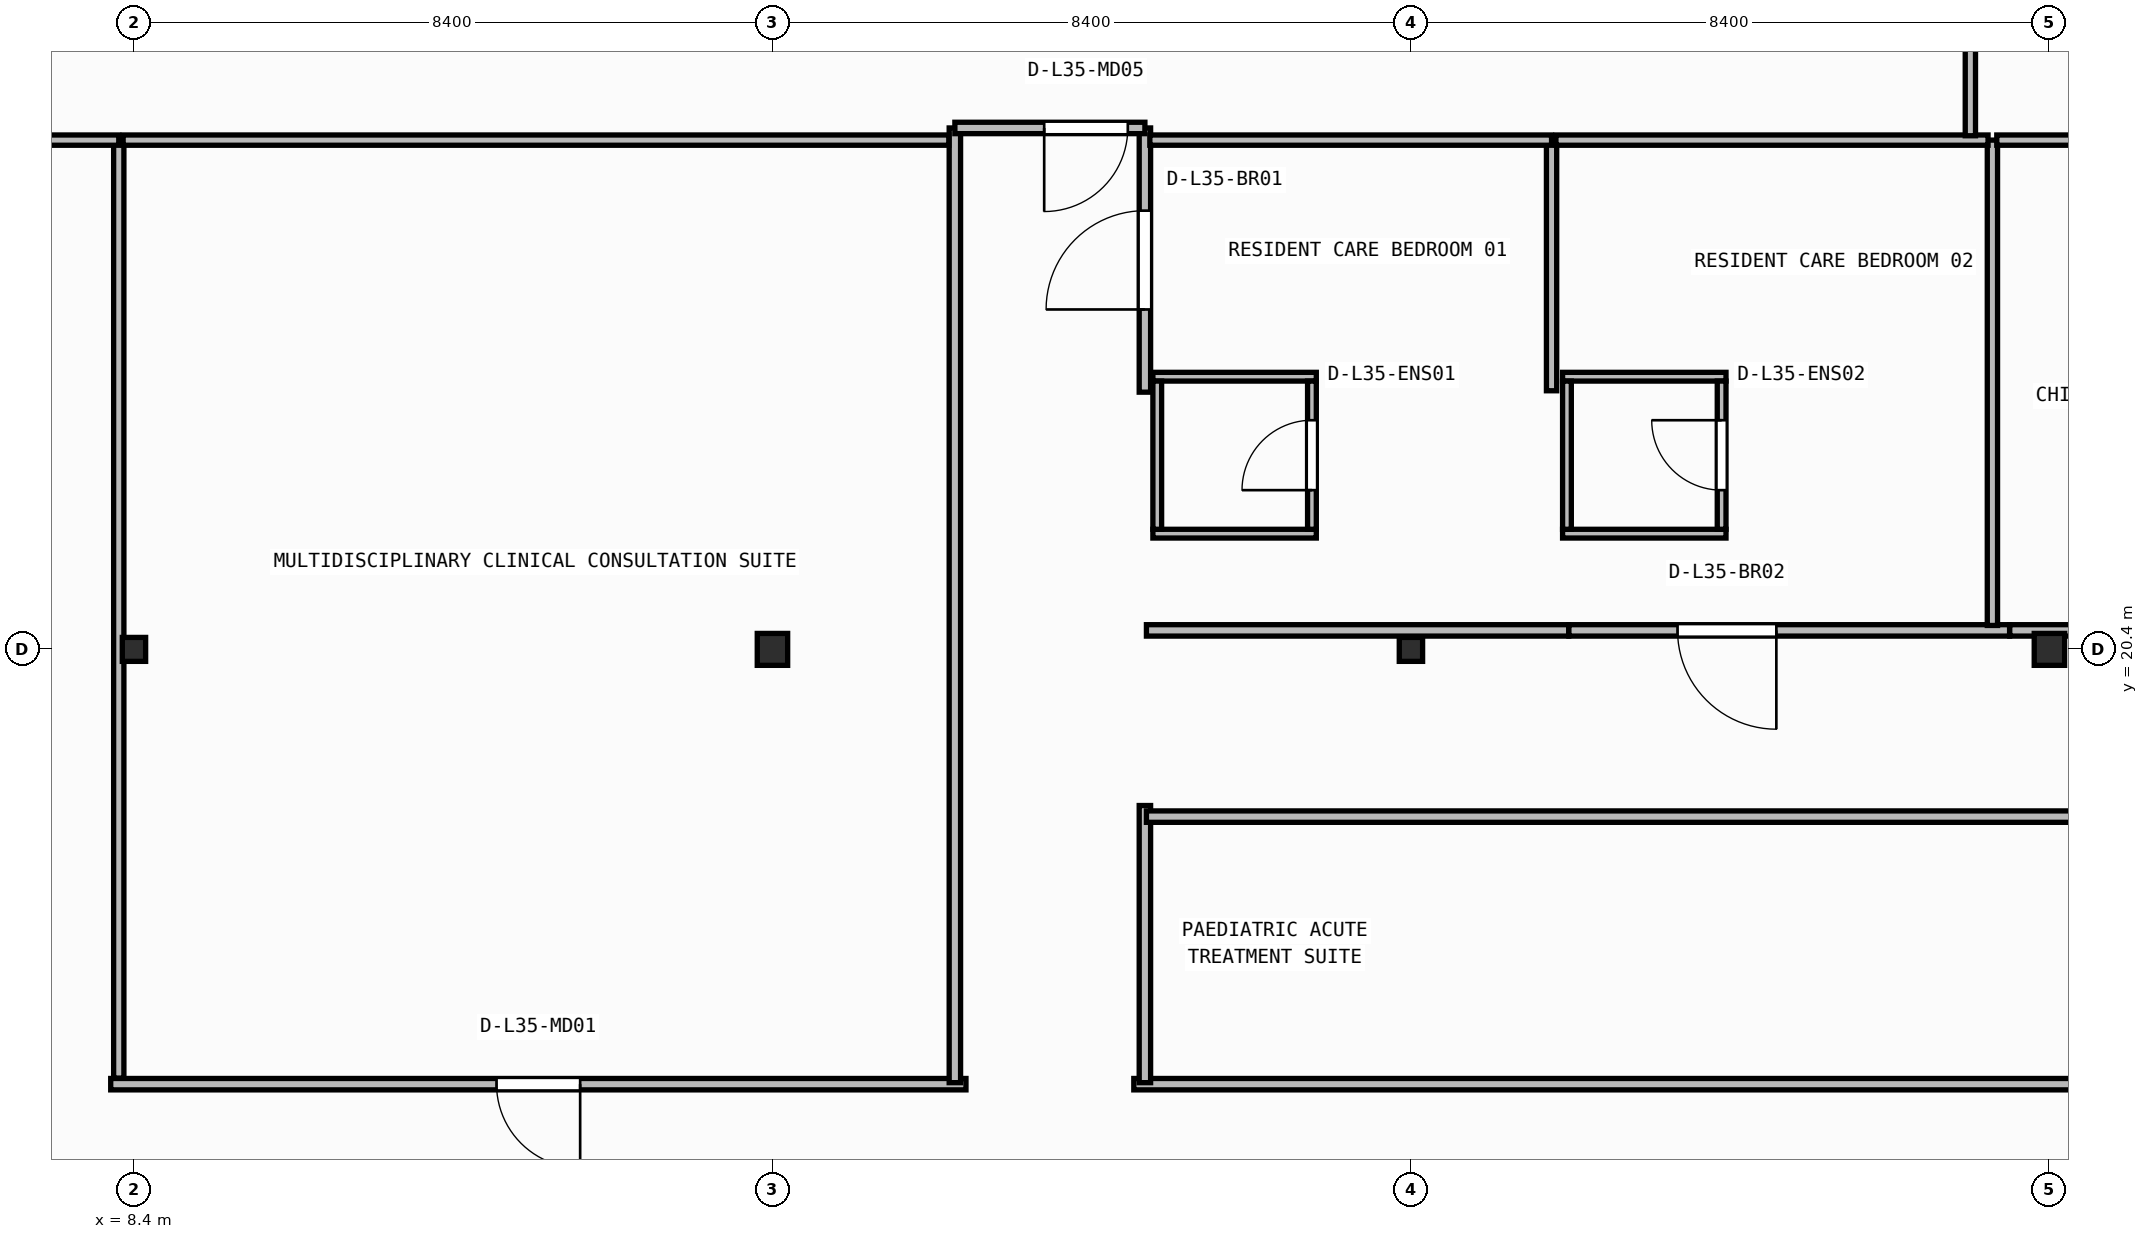
"""IFC4 building model, lengths in metres.
Left out: names, types, materials, properties, quantities, classifications, styles, units other than length and angle.
Written with IfcOpenShell. Run it as: python <this file> out.ifc"""

import sys

from ifc_helpers import new_model, si_unit, direction, frame, frame_2d, origin, origin_2d, place, context, subcontext, project, spatial, rectangle, i_section, extrude, element, fill, save


model = new_model("IFC4")
c1 = context("Model", 3, precision=1e-05, world=origin(), true_north=direction((0.0, 1.0)))
c2 = subcontext(c1, "Body", "Model", "MODEL_VIEW")
j1 = project(units=[si_unit("LENGTHUNIT", "METRE"), si_unit("PLANEANGLEUNIT", "RADIAN")], contexts=[c1])
p1 = place(None, origin())
s1 = spatial("IfcSite", under=j1, at=p1, CompositionType="ELEMENT")
p2 = place(p1, origin())
s2 = spatial("IfcBuilding", under=s1, at=p2, CompositionType="ELEMENT")
p3 = place(p2, frame((0.0, 0.0, 142.85)))
s3 = spatial("IfcBuildingStorey", under=s2, at=p3, CompositionType="ELEMENT", Elevation=142.85)
p4 = place(p3, frame((8.4, 20.4, 0.0), z_axis=(0.0, 0.0, 1.0), x_axis=(1.0, 0.0, 0.0)))
e1 = element("IfcColumn", 1, at=p4, inside=s3, PredefinedType="COLUMN", context=c2, shape_type="SweptSolid", body=[
    extrude(i_section(OverallWidth=0.307, OverallDepth=0.315, WebThickness=0.012, FlangeThickness=0.019, FilletRadius=0.017, at=origin_2d()), origin(), (0.0, 0.0, 1.0), 3.95),
])
p5 = place(p3, frame((16.8, 20.4, 0.0), z_axis=(0.0, 0.0, 1.0), x_axis=(1.0, 0.0, 0.0)))
e2 = element("IfcColumn", 2, at=p5, inside=s3, PredefinedType="COLUMN", context=c2, shape_type="SweptSolid", body=[
    extrude(i_section(OverallWidth=0.4, OverallDepth=0.42, WebThickness=0.025, FlangeThickness=0.04, at=origin_2d()), origin(), (0.0, 0.0, 1.0), 3.95),
])
p6 = place(p3, frame((25.2, 20.4, 0.0), z_axis=(0.0, 0.0, 1.0), x_axis=(1.0, 0.0, 0.0)))
e3 = element("IfcColumn", 3, at=p6, inside=s3, PredefinedType="COLUMN", context=c2, shape_type="SweptSolid", body=[
    extrude(i_section(OverallWidth=0.307, OverallDepth=0.315, WebThickness=0.012, FlangeThickness=0.019, FilletRadius=0.017, at=origin_2d()), origin(), (0.0, 0.0, 1.0), 3.95),
])
p7 = place(p3, frame((33.6, 20.4, 0.0), z_axis=(0.0, 0.0, 1.0), x_axis=(1.0, 0.0, 0.0)))
e4 = element("IfcColumn", 4, at=p7, inside=s3, PredefinedType="COLUMN", context=c2, shape_type="SweptSolid", body=[
    extrude(i_section(OverallWidth=0.4, OverallDepth=0.42, WebThickness=0.025, FlangeThickness=0.04, at=origin_2d()), origin(), (0.0, 0.0, 1.0), 3.95),
])
for number, where, z_axis, x_axis in (
    (5, (21.805, 21.923, 0.0), (0.0, 0.0, 1.0), (1.0, 0.0, 0.0)),
    (6, (21.805, 23.988, 0.0), (0.0, 0.0, 1.0), (1.0, 0.0, 0.0)),
):
    element("IfcWall", number, at=place(p3, frame(where, z_axis=z_axis, x_axis=x_axis)), inside=s3, PredefinedType="PARTITIONING", context=c2, shape_type="SweptSolid", body=[
        extrude(rectangle(XDim=2.15, YDim=0.115, at=frame_2d((1.075, 0.0))), origin(), (0.0, 0.0, 1.0), 3.71),
    ])
p8 = place(p3, frame((21.863, 21.98, 0.0), z_axis=(0.0, 0.0, 1.0), x_axis=(0.0, 1.0, 0.0)))
e7 = element("IfcWall", 7, at=p8, inside=s3, PredefinedType="PARTITIONING", context=c2, shape_type="SweptSolid", body=[
    extrude(rectangle(XDim=1.95, YDim=0.115, at=frame_2d((0.975, 0.0))), origin(), (0.0, 0.0, 1.0), 3.71),
])
p9 = place(p3, frame((23.897, 21.98, 0.0), z_axis=(0.0, 0.0, 1.0), x_axis=(0.0, 1.0, 0.0)))
e8 = element("IfcWall", 8, at=p9, inside=s3, PredefinedType="PARTITIONING", context=c2, shape_type="SweptSolid", body=[
    extrude(rectangle(XDim=1.95, YDim=0.115, at=frame_2d((0.975, 0.0))), origin(), (0.0, 0.0, 1.0), 3.71),
])
p10 = place(p9, frame((0.515, 0.0, 0.0)))
e9 = element("IfcOpeningElement", 9, at=p10, cuts=e8, PredefinedType="OPENING", context=c2, shape_type="SweptSolid", body=[
    extrude(rectangle(XDim=0.92, YDim=2.1, at=frame_2d((0.46, 1.05))), frame((0.0, 0.067, 0.0), z_axis=(0.0, -1.0, 0.0), x_axis=(1.0, 0.0, 0.0)), (0.0, 0.0, 1.0), 0.135),
])
for number, where, z_axis, x_axis in (
    (10, (27.195, 21.923, 0.0), (0.0, 0.0, 1.0), (1.0, 0.0, 0.0)),
    (11, (27.195, 23.988, 0.0), (0.0, 0.0, 1.0), (1.0, 0.0, 0.0)),
):
    element("IfcWall", number, at=place(p3, frame(where, z_axis=z_axis, x_axis=x_axis)), inside=s3, PredefinedType="PARTITIONING", context=c2, shape_type="SweptSolid", body=[
        extrude(rectangle(XDim=2.15, YDim=0.115, at=frame_2d((1.075, 0.0))), origin(), (0.0, 0.0, 1.0), 3.71),
    ])
p11 = place(p3, frame((27.252, 21.98, 0.0), z_axis=(0.0, 0.0, 1.0), x_axis=(0.0, 1.0, 0.0)))
e12 = element("IfcWall", 12, at=p11, inside=s3, PredefinedType="PARTITIONING", context=c2, shape_type="SweptSolid", body=[
    extrude(rectangle(XDim=1.95, YDim=0.115, at=frame_2d((0.975, 0.0))), origin(), (0.0, 0.0, 1.0), 3.71),
])
p12 = place(p3, frame((29.288, 21.98, 0.0), z_axis=(0.0, 0.0, 1.0), x_axis=(0.0, 1.0, 0.0)))
e13 = element("IfcWall", 13, at=p12, inside=s3, PredefinedType="PARTITIONING", context=c2, shape_type="SweptSolid", body=[
    extrude(rectangle(XDim=1.95, YDim=0.115, at=frame_2d((0.975, 0.0))), origin(), (0.0, 0.0, 1.0), 3.71),
])
p13 = place(p12, frame((0.515, 0.0, 0.0)))
e14 = element("IfcOpeningElement", 14, at=p13, cuts=e13, PredefinedType="OPENING", context=c2, shape_type="SweptSolid", body=[
    extrude(rectangle(XDim=0.92, YDim=2.1, at=frame_2d((0.46, 1.05))), frame((0.0, 0.067, 0.0), z_axis=(0.0, -1.0, 0.0), x_axis=(1.0, 0.0, 0.0)), (0.0, 0.0, 1.0), 0.135),
])
p14 = place(p3, frame((19.346, 14.68, 0.0), z_axis=(0.0, 0.0, 1.0), x_axis=(-1.0, 0.0, 0.0)))
e15 = element("IfcWall", 15, at=p14, inside=s3, PredefinedType="PARTITIONING", context=c2, shape_type="SweptSolid", body=[
    extrude(rectangle(XDim=11.252, YDim=0.15, at=frame_2d((5.626, 0.0))), origin(), (0.0, 0.0, 1.0), 3.71),
])
p15 = place(p14, frame((5.076, 0.0, 0.0)))
e16 = element("IfcOpeningElement", 16, at=p15, cuts=e15, PredefinedType="OPENING", context=c2, shape_type="SweptSolid", body=[
    extrude(rectangle(XDim=1.1, YDim=2.1, at=frame_2d((0.55, 1.05))), frame((0.0, 0.085, 0.0), z_axis=(0.0, -1.0, 0.0), x_axis=(1.0, 0.0, 0.0)), (0.0, 0.0, 1.0), 0.17),
])
p16 = place(p3, frame((56.64, 14.68, 0.0), z_axis=(0.0, 0.0, 1.0), x_axis=(-1.0, 0.0, 0.0)))
e17 = element("IfcWall", 17, at=p16, inside=s3, PredefinedType="PARTITIONING", context=c2, shape_type="SweptSolid", body=[
    extrude(rectangle(XDim=35.086, YDim=0.15, at=frame_2d((17.543, 0.0))), origin(), (0.0, 0.0, 1.0), 3.71),
])
p17 = place(p16, frame((16.993, 0.0, 0.0)))
e18 = element("IfcOpeningElement", 18, at=p17, cuts=e17, PredefinedType="OPENING", context=c2, shape_type="SweptSolid", body=[
    extrude(rectangle(XDim=1.1, YDim=2.1, at=frame_2d((0.55, 1.05))), frame((0.0, 0.085, 0.0), z_axis=(0.0, -1.0, 0.0), x_axis=(1.0, 0.0, 0.0)), (0.0, 0.0, 1.0), 0.17),
])
p18 = place(p3, frame((19.2, 27.26, 0.0), z_axis=(0.0, 0.0, 1.0), x_axis=(0.0, -1.0, 0.0)))
e19 = element("IfcWall", 19, at=p18, inside=s3, PredefinedType="PARTITIONING", context=c2, shape_type="SweptSolid", body=[
    extrude(rectangle(XDim=12.56, YDim=0.15, at=frame_2d((6.28, 0.0))), origin(), (0.0, 0.0, 1.0), 3.71),
])
p19 = place(p3, frame((21.7, 14.7, 0.0), z_axis=(0.0, 0.0, 1.0), x_axis=(0.0, 1.0, 0.0)))
e20 = element("IfcWall", 20, at=p19, inside=s3, PredefinedType="PARTITIONING", context=c2, shape_type="SweptSolid", body=[
    extrude(rectangle(XDim=3.646, YDim=0.15, at=frame_2d((1.823, 0.0))), origin(), (0.0, 0.0, 1.0), 3.71),
])
p20 = place(p3, frame((21.7, 23.784, 0.0), z_axis=(0.0, 0.0, 1.0), x_axis=(0.0, 1.0, 0.0)))
e21 = element("IfcWall", 21, at=p20, inside=s3, PredefinedType="PARTITIONING", context=c2, shape_type="SweptSolid", body=[
    extrude(rectangle(XDim=3.476, YDim=0.15, at=frame_2d((1.738, 0.0))), origin(), (0.0, 0.0, 1.0), 3.71),
])
p21 = place(p20, frame((1.088, 0.0, 0.0)))
e22 = element("IfcOpeningElement", 22, at=p21, cuts=e21, PredefinedType="OPENING", context=c2, shape_type="SweptSolid", body=[
    extrude(rectangle(XDim=1.3, YDim=2.15, at=frame_2d((0.65, 1.075))), frame((0.0, 0.085, 0.0), z_axis=(0.0, -1.0, 0.0), x_axis=(1.0, 0.0, 0.0)), (0.0, 0.0, 1.0), 0.17),
])
p22 = place(p3, frame((21.7, 27.26, 0.0), z_axis=(0.0, 0.0, 1.0), x_axis=(-1.0, 0.0, 0.0)))
e23 = element("IfcWall", 23, at=p22, inside=s3, PredefinedType="PARTITIONING", context=c2, shape_type="SweptSolid", body=[
    extrude(rectangle(XDim=2.5, YDim=0.15, at=frame_2d((1.25, 0.0))), origin(), (0.0, 0.0, 1.0), 3.71),
])
p23 = place(p22, frame((0.225, 0.0, 0.0)))
e24 = element("IfcOpeningElement", 24, at=p23, cuts=e23, PredefinedType="OPENING", context=c2, shape_type="SweptSolid", body=[
    extrude(rectangle(XDim=1.1, YDim=2.1, at=frame_2d((0.55, 1.05))), frame((0.0, 0.085, 0.0), z_axis=(0.0, -1.0, 0.0), x_axis=(1.0, 0.0, 0.0)), (0.0, 0.0, 1.0), 0.17),
])
p24 = place(p3, frame((21.72, 18.2, 0.0), z_axis=(0.0, 0.0, 1.0), x_axis=(1.0, 0.0, 0.0)))
e25 = element("IfcWall", 25, at=p24, inside=s3, PredefinedType="PARTITIONING", context=c2, shape_type="SweptSolid", body=[
    extrude(rectangle(XDim=34.92, YDim=0.15, at=frame_2d((17.46, 0.0))), origin(), (0.0, 0.0, 1.0), 3.71),
])
p25 = place(p3, frame((27.276, 20.65, 0.0), z_axis=(0.0, 0.0, 1.0), x_axis=(-1.0, 0.0, 0.0)))
e26 = element("IfcWall", 26, at=p25, inside=s3, PredefinedType="PARTITIONING", context=c2, shape_type="SweptSolid", body=[
    extrude(rectangle(XDim=5.556, YDim=0.15, at=frame_2d((2.778, 0.0))), origin(), (0.0, 0.0, 1.0), 3.083),
])
p26 = place(p3, frame((33.076, 20.65, 0.0), z_axis=(0.0, 0.0, 1.0), x_axis=(-1.0, 0.0, 0.0)))
e27 = element("IfcWall", 27, at=p26, inside=s3, PredefinedType="PARTITIONING", context=c2, shape_type="SweptSolid", body=[
    extrude(rectangle(XDim=5.798, YDim=0.15, at=frame_2d((2.899, 0.0))), origin(), (0.0, 0.0, 1.0), 3.083),
])
p27 = place(p26, frame((3.069, 0.0, 0.0)))
e28 = element("IfcOpeningElement", 28, at=p27, cuts=e27, PredefinedType="OPENING", context=c2, shape_type="SweptSolid", body=[
    extrude(rectangle(XDim=1.3, YDim=2.15, at=frame_2d((0.65, 1.075))), frame((0.0, 0.085, 0.0), z_axis=(0.0, -1.0, 0.0), x_axis=(1.0, 0.0, 0.0)), (0.0, 0.0, 1.0), 0.17),
])
p28 = place(p3, frame((39.336, 20.65, 0.0), z_axis=(0.0, 0.0, 1.0), x_axis=(-1.0, 0.0, 0.0)))
e29 = element("IfcWall", 29, at=p28, inside=s3, PredefinedType="PARTITIONING", context=c2, shape_type="SweptSolid", body=[
    extrude(rectangle(XDim=6.258, YDim=0.15, at=frame_2d((3.129, 0.0))), origin(), (0.0, 0.0, 1.0), 3.083),
])
p29 = place(p28, frame((0.319, 0.0, 0.0)))
e30 = element("IfcOpeningElement", 30, at=p29, cuts=e29, PredefinedType="OPENING", context=c2, shape_type="SweptSolid", body=[
    extrude(rectangle(XDim=1.1, YDim=2.1, at=frame_2d((0.55, 1.05))), frame((0.0, 0.085, 0.0), z_axis=(0.0, -1.0, 0.0), x_axis=(1.0, 0.0, 0.0)), (0.0, 0.0, 1.0), 0.17),
])
p30 = place(p3, frame((8.2, 14.76, 0.0), z_axis=(0.0, 0.0, 1.0), x_axis=(0.0, 1.0, 0.0)))
e31 = element("IfcWall", 31, at=p30, inside=s3, PredefinedType="PARTITIONING", context=c2, shape_type="SweptSolid", body=[
    extrude(rectangle(XDim=12.34, YDim=0.135, at=frame_2d((6.17, 0.0))), origin(), (0.0, 0.0, 1.0), 3.152),
])
p31 = place(p3, frame((8.2, 27.1, 0.0), z_axis=(0.0, 0.0, 1.0), x_axis=(-1.0, 0.0, 0.0)))
e32 = element("IfcWall", 32, at=p31, inside=s3, PredefinedType="PARTITIONING", context=c2, shape_type="SweptSolid", body=[
    extrude(rectangle(XDim=7.96, YDim=0.135, at=frame_2d((3.98, 0.0))), origin(), (0.0, 0.0, 1.0), 3.71),
])
p32 = place(p3, frame((19.12, 27.1, 0.0), z_axis=(0.0, 0.0, 1.0), x_axis=(-1.0, 0.0, 0.0)))
e33 = element("IfcWall", 33, at=p32, inside=s3, PredefinedType="PARTITIONING", context=c2, shape_type="SweptSolid", body=[
    extrude(rectangle(XDim=10.863, YDim=0.135, at=frame_2d((5.431, 0.0))), origin(), (0.0, 0.0, 1.0), 3.71),
])
p33 = place(p3, frame((27.05, 23.802, 0.0), z_axis=(0.0, 0.0, 1.0), x_axis=(0.0, 1.0, 0.0)))
e34 = element("IfcWall", 34, at=p33, inside=s3, PredefinedType="PARTITIONING", context=c2, shape_type="SweptSolid", body=[
    extrude(rectangle(XDim=3.298, YDim=0.135, at=frame_2d((1.649, 0.0))), origin(), (0.0, 0.0, 1.0), 3.71),
])
p34 = place(p3, frame((27.05, 27.1, 0.0), z_axis=(0.0, 0.0, 1.0), x_axis=(-1.0, 0.0, 0.0)))
e35 = element("IfcWall", 35, at=p34, inside=s3, PredefinedType="PARTITIONING", context=c2, shape_type="SweptSolid", body=[
    extrude(rectangle(XDim=5.285, YDim=0.135, at=frame_2d((2.643, 0.0))), origin(), (0.0, 0.0, 1.0), 3.71),
])
p35 = place(p3, frame((32.85, 20.715, 0.0), z_axis=(0.0, 0.0, 1.0), x_axis=(0.0, 1.0, 0.0)))
e36 = element("IfcWall", 36, at=p35, inside=s3, PredefinedType="PARTITIONING", context=c2, shape_type="SweptSolid", body=[
    extrude(rectangle(XDim=6.385, YDim=0.135, at=frame_2d((3.192, 0.0))), origin(), (0.0, 0.0, 1.0), 3.71),
])
p36 = place(p3, frame((32.792, 27.1, 0.0), z_axis=(0.0, 0.0, 1.0), x_axis=(-1.0, 0.0, 0.0)))
e37 = element("IfcWall", 37, at=p36, inside=s3, PredefinedType="PARTITIONING", context=c2, shape_type="SweptSolid", body=[
    extrude(rectangle(XDim=5.685, YDim=0.135, at=frame_2d((2.843, 0.0))), origin(), (0.0, 0.0, 1.0), 3.71),
])
p37 = place(p3, frame((39.11, 27.1, 0.0), z_axis=(0.0, 0.0, 1.0), x_axis=(-1.0, 0.0, 0.0)))
e38 = element("IfcWall", 38, at=p37, inside=s3, PredefinedType="PARTITIONING", context=c2, shape_type="SweptSolid", body=[
    extrude(rectangle(XDim=6.203, YDim=0.135, at=frame_2d((3.101, 0.0))), origin(), (0.0, 0.0, 1.0), 3.71),
])
p38 = place(p37, frame((0.318, 0.0, 0.0)))
e39 = element("IfcOpeningElement", 39, at=p38, cuts=e38, PredefinedType="OPENING", context=c2, shape_type="SweptSolid", body=[
    extrude(rectangle(XDim=1.1, YDim=2.1, at=frame_2d((0.55, 1.05))), frame((0.0, 0.077, 0.0), z_axis=(0.0, -1.0, 0.0), x_axis=(1.0, 0.0, 0.0)), (0.0, 0.0, 1.0), 0.155),
])
p39 = place(p3, frame((32.56, 27.157, 0.0), z_axis=(0.0, 0.0, 1.0), x_axis=(0.0, 1.0, 0.0)))
e40 = element("IfcWall", 40, at=p39, inside=s3, PredefinedType="PARTITIONING", context=c2, shape_type="SweptSolid", body=[
    extrude(rectangle(XDim=4.166, YDim=0.135, at=frame_2d((2.083, 0.0))), origin(), (0.0, 0.0, 1.0), 3.71),
])
p40 = place(p10, origin())
e41 = element("IfcDoor", 41, at=p40, inside=s3, OperationType="SINGLE_SWING_LEFT", PredefinedType="DOOR", context=c2, shape_type="SweptSolid", body=[
    extrude(rectangle(XDim=0.92, YDim=2.1, at=frame_2d((0.46, 1.05))), frame((0.0, 0.025, 0.0), z_axis=(0.0, -1.0, 0.0), x_axis=(1.0, 0.0, 0.0)), (0.0, 0.0, 1.0), 0.05),
])
fill(e9, e41)
p41 = place(p13, origin())
e42 = element("IfcDoor", 42, at=p41, inside=s3, OperationType="SINGLE_SWING_RIGHT", PredefinedType="DOOR", context=c2, shape_type="SweptSolid", body=[
    extrude(rectangle(XDim=0.92, YDim=2.1, at=frame_2d((0.46, 1.05))), frame((0.0, 0.025, 0.0), z_axis=(0.0, -1.0, 0.0), x_axis=(1.0, 0.0, 0.0)), (0.0, 0.0, 1.0), 0.05),
])
fill(e14, e42)
p42 = place(p15, origin())
e43 = element("IfcDoor", 43, at=p42, inside=s3, OperationType="SINGLE_SWING_LEFT", PredefinedType="DOOR", context=c2, shape_type="SweptSolid", body=[
    extrude(rectangle(XDim=1.1, YDim=2.1, at=frame_2d((0.55, 1.05))), frame((0.0, 0.025, 0.0), z_axis=(0.0, -1.0, 0.0), x_axis=(1.0, 0.0, 0.0)), (0.0, 0.0, 1.0), 0.05),
])
fill(e16, e43)
p43 = place(p21, origin())
e44 = element("IfcDoor", 44, at=p43, inside=s3, OperationType="SINGLE_SWING_LEFT", PredefinedType="DOOR", context=c2, shape_type="SweptSolid", body=[
    extrude(rectangle(XDim=1.3, YDim=2.15, at=frame_2d((0.65, 1.075))), frame((0.0, 0.025, 0.0), z_axis=(0.0, -1.0, 0.0), x_axis=(1.0, 0.0, 0.0)), (0.0, 0.0, 1.0), 0.05),
])
fill(e22, e44)
p44 = place(p23, origin())
e45 = element("IfcDoor", 45, at=p44, inside=s3, OperationType="SINGLE_SWING_RIGHT", PredefinedType="DOOR", context=c2, shape_type="SweptSolid", body=[
    extrude(rectangle(XDim=1.1, YDim=2.1, at=frame_2d((0.55, 1.05))), frame((0.0, 0.025, 0.0), z_axis=(0.0, -1.0, 0.0), x_axis=(1.0, 0.0, 0.0)), (0.0, 0.0, 1.0), 0.05),
])
fill(e24, e45)
p45 = place(p27, origin())
e46 = element("IfcDoor", 46, at=p45, inside=s3, OperationType="SINGLE_SWING_LEFT", PredefinedType="DOOR", context=c2, shape_type="SweptSolid", body=[
    extrude(rectangle(XDim=1.3, YDim=2.15, at=frame_2d((0.65, 1.075))), frame((0.0, 0.025, 0.0), z_axis=(0.0, -1.0, 0.0), x_axis=(1.0, 0.0, 0.0)), (0.0, 0.0, 1.0), 0.05),
])
fill(e28, e46)
save(model, sys.argv[1])
